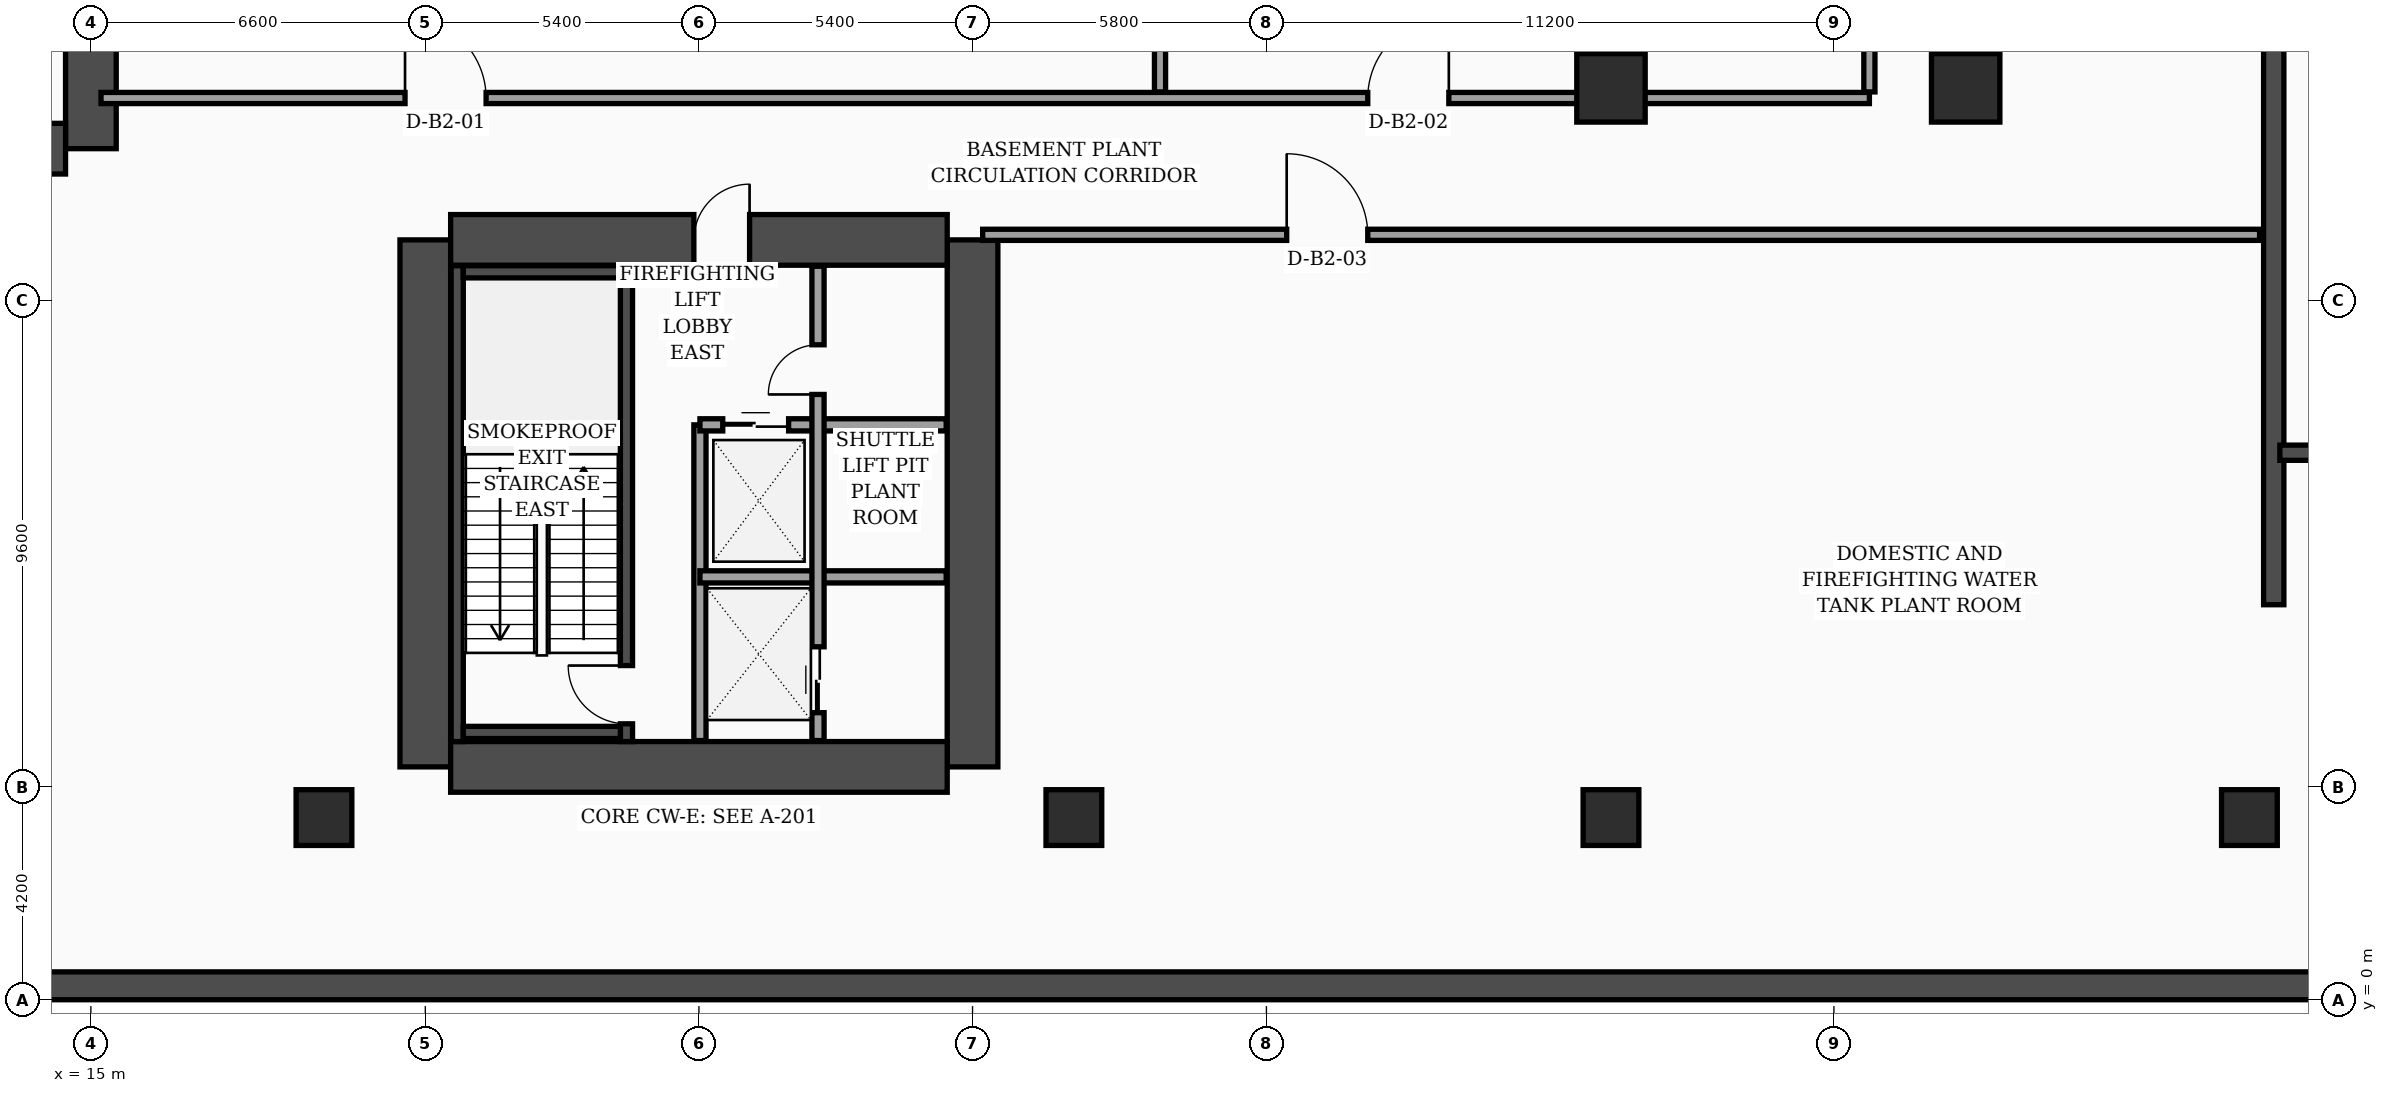
"""IFC4 building model, lengths in metres.
Left out: names, types, materials, properties, quantities, classifications, styles, units other than length and angle.
Written with IfcOpenShell. Run it as: python <this file> out.ifc"""

import sys

from ifc_helpers import new_model, si_unit, direction, frame, frame_2d, origin, origin_2d, place, context, subcontext, project, spatial, rectangle, hollow_rectangle, extrude, element, fill, save


model = new_model("IFC4")
c1 = context("Model", 3, precision=1e-05, world=origin(), true_north=direction((0.0, 1.0)))
c2 = subcontext(c1, "Body", "Model", "MODEL_VIEW")
j1 = project(units=[si_unit("LENGTHUNIT", "METRE"), si_unit("PLANEANGLEUNIT", "RADIAN")], contexts=[c1])
p1 = place(None, origin())
s1 = spatial("IfcSite", under=j1, at=p1, CompositionType="ELEMENT")
p2 = place(p1, origin())
s2 = spatial("IfcBuilding", under=s1, at=p2, CompositionType="ELEMENT")
p3 = place(p2, frame((0.0, 0.0, -10.4)))
s3 = spatial("IfcBuildingStorey", under=s2, at=p3, CompositionType="ELEMENT", Elevation=-10.4)
p4 = place(p3, frame((0.28, 0.28, 0.0), z_axis=(0.0, 0.0, 1.0), x_axis=(1.0, 0.0, 0.0)))
e1 = element("IfcWall", 1, at=p4, inside=s3, PredefinedType="USERDEFINED", context=c2, shape_type="SweptSolid", body=[
    extrude(rectangle(XDim=83.44, YDim=0.55, at=frame_2d((41.72, 0.0))), origin(), (0.0, 0.0, 1.0), 4.88),
])
p5 = place(p3, frame((15.0, 16.8, 0.0), z_axis=(0.0, 0.0, 1.0), x_axis=(0.0, 1.0, 0.0)))
e2 = element("IfcWall", 2, at=p5, inside=s3, PredefinedType="SHEAR", context=c2, shape_type="SweptSolid", body=[
    extrude(rectangle(XDim=21.6, YDim=1.0, at=frame_2d((10.8, 0.0))), origin(), (0.0, 0.0, 1.0), 4.88),
])
p6 = place(p5, frame((8.65, 0.0, 0.0)))
e3 = element("IfcOpeningElement", 3, at=p6, cuts=e2, PredefinedType="OPENING", context=c2, shape_type="SweptSolid", body=[
    extrude(rectangle(XDim=1.1, YDim=2.2, at=frame_2d((0.55, 1.1))), frame((0.0, 0.51, 0.0), z_axis=(0.0, -1.0, 0.0), x_axis=(1.0, 0.0, 0.0)), (0.0, 0.0, 1.0), 1.02),
])
p7 = place(p3, frame((4.7, 16.8, 0.0), z_axis=(0.0, 0.0, 1.0), x_axis=(1.0, 0.0, 0.0)))
e4 = element("IfcWall", 4, at=p7, inside=s3, PredefinedType="SHEAR", context=c2, shape_type="SweptSolid", body=[
    extrude(rectangle(XDim=9.8, YDim=1.0, at=frame_2d((4.9, 0.0))), origin(), (0.0, 0.0, 1.0), 4.88),
])
for number, where, z_axis, x_axis in (
    (5, (21.6, 4.6, 0.0), (0.0, 0.0, 1.0), (0.0, 1.0, 0.0)),
    (6, (32.4, 4.6, 0.0), (0.0, 0.0, 1.0), (0.0, 1.0, 0.0)),
):
    element("IfcWall", number, at=place(p3, frame(where, z_axis=z_axis, x_axis=x_axis)), inside=s3, PredefinedType="SHEAR", context=c2, shape_type="SweptSolid", body=[
        extrude(rectangle(XDim=10.4, YDim=1.0, at=frame_2d((5.2, 0.0))), origin(), (0.0, 0.0, 1.0), 4.88),
    ])
p8 = place(p3, frame((22.1, 15.0, 0.0), z_axis=(0.0, 0.0, 1.0), x_axis=(1.0, 0.0, 0.0)))
e7 = element("IfcWall", 7, at=p8, inside=s3, PredefinedType="SHEAR", context=c2, shape_type="SweptSolid", body=[
    extrude(rectangle(XDim=9.8, YDim=1.0, at=frame_2d((4.9, 0.0))), origin(), (0.0, 0.0, 1.0), 4.88),
])
p9 = place(p8, frame((4.8, 0.0, 0.0)))
e8 = element("IfcOpeningElement", 8, at=p9, cuts=e7, PredefinedType="OPENING", context=c2, shape_type="SweptSolid", body=[
    extrude(rectangle(XDim=1.1, YDim=2.2, at=frame_2d((0.55, 1.1))), frame((0.0, 0.51, 0.0), z_axis=(0.0, -1.0, 0.0), x_axis=(1.0, 0.0, 0.0)), (0.0, 0.0, 1.0), 1.02),
])
p10 = place(p3, frame((22.1, 4.6, 0.0), z_axis=(0.0, 0.0, 1.0), x_axis=(1.0, 0.0, 0.0)))
e9 = element("IfcWall", 9, at=p10, inside=s3, PredefinedType="SHEAR", context=c2, shape_type="SweptSolid", body=[
    extrude(rectangle(XDim=9.8, YDim=1.0, at=frame_2d((4.9, 0.0))), origin(), (0.0, 0.0, 1.0), 4.88),
])
p11 = place(p3, frame((22.23, 5.1, 0.0), z_axis=(0.0, 0.0, 1.0), x_axis=(0.0, 1.0, 0.0)))
e10 = element("IfcWall", 10, at=p11, inside=s3, PredefinedType="SOLIDWALL", context=c2, shape_type="SweptSolid", body=[
    extrude(rectangle(XDim=9.39, YDim=0.24, at=frame_2d((4.695, 0.0))), origin(), (0.0, 0.0, 1.0), 4.88),
])
p12 = place(p3, frame((25.57, 5.1, 0.0), z_axis=(0.0, 0.0, 1.0), x_axis=(0.0, 1.0, 0.0)))
e11 = element("IfcWall", 11, at=p12, inside=s3, PredefinedType="SOLIDWALL", context=c2, shape_type="SweptSolid", body=[
    extrude(rectangle(XDim=9.39, YDim=0.24, at=frame_2d((4.695, 0.0))), origin(), (0.0, 0.0, 1.0), 4.88),
])
p13 = place(p12, frame((0.35, 0.0, 0.0)))
e12 = element("IfcOpeningElement", 12, at=p13, cuts=e11, PredefinedType="OPENING", context=c2, shape_type="SweptSolid", body=[
    extrude(rectangle(XDim=1.15, YDim=2.2, at=frame_2d((0.575, 1.1))), frame((0.0, 0.13, 0.0), z_axis=(0.0, -1.0, 0.0), x_axis=(1.0, 0.0, 0.0)), (0.0, 0.0, 1.0), 0.26),
])
for number, where, z_axis, x_axis in (
    (13, (22.35, 5.28, 0.0), (0.0, 0.0, 1.0), (1.0, 0.0, 0.0)),
    (14, (22.35, 14.37, 0.0), (0.0, 0.0, 1.0), (1.0, 0.0, 0.0)),
):
    element("IfcWall", number, at=place(p3, frame(where, z_axis=z_axis, x_axis=x_axis)), inside=s3, PredefinedType="SOLIDWALL", context=c2, shape_type="SweptSolid", body=[
        extrude(rectangle(XDim=3.1, YDim=0.24, at=frame_2d((1.55, 0.0))), origin(), (0.0, 0.0, 1.0), 4.88),
    ])
for number, where, z_axis, x_axis in (
    (15, (19.6, 3.6, 0.0), (0.0, 0.0, 1.0), (1.0, 0.0, 0.0)),
    (16, (34.4, 3.6, 0.0), (0.0, 0.0, 1.0), (1.0, 0.0, 0.0)),
    (17, (45.0, 3.6, 0.0), (0.0, 0.0, 1.0), (1.0, 0.0, 0.0)),
    (18, (57.6, 3.6, 0.0), (0.0, 0.0, 1.0), (1.0, 0.0, 0.0)),
):
    element("IfcColumn", number, at=place(p3, frame(where, z_axis=z_axis, x_axis=x_axis)), inside=s3, PredefinedType="COLUMN", context=c2, shape_type="SweptSolid", body=[
        extrude(hollow_rectangle(XDim=1.1, YDim=1.1, WallThickness=0.045, at=origin_2d()), origin(), (0.0, 0.0, 1.0), 4.88),
    ])
for number, where, z_axis, x_axis in (
    (19, (45.0, 18.0, 0.0), (0.0, 0.0, 1.0), (1.0, 0.0, 0.0)),
    (20, (52.0, 18.0, 0.0), (0.0, 0.0, 1.0), (1.0, 0.0, 0.0)),
):
    element("IfcColumn", number, at=place(p3, frame(where, z_axis=z_axis, x_axis=x_axis)), inside=s3, PredefinedType="COLUMN", context=c2, shape_type="SweptSolid", body=[
        extrude(rectangle(XDim=1.35, YDim=1.35, at=origin_2d()), origin(), (0.0, 0.0, 1.0), 4.88),
    ])
p14 = place(p3, frame((58.08, 7.8, 0.0), z_axis=(0.0, 0.0, 1.0), x_axis=(0.0, 1.0, 0.0)))
e21 = element("IfcWall", 21, at=p14, inside=s3, PredefinedType="USERDEFINED", context=c2, shape_type="SweptSolid", body=[
    extrude(rectangle(XDim=35.3, YDim=0.4, at=frame_2d((17.65, 0.0))), origin(), (0.0, 0.0, 1.0), 4.88),
])
p15 = place(p3, frame((58.2, 10.8, 0.0), z_axis=(0.0, 0.0, 1.0), x_axis=(1.0, 0.0, 0.0)))
e22 = element("IfcWall", 22, at=p15, inside=s3, PredefinedType="SOLIDWALL", context=c2, shape_type="SweptSolid", body=[
    extrude(rectangle(XDim=6.6, YDim=0.3, at=frame_2d((3.3, 0.0))), origin(), (0.0, 0.0, 1.0), 4.88),
])
p16 = place(p3, frame((27.02, 5.12, 0.0), z_axis=(0.0, 0.0, 1.0), x_axis=(0.0, 1.0, 0.0)))
e23 = element("IfcWall", 23, at=p16, inside=s3, PredefinedType="SOLIDWALL", context=c2, shape_type="SweptSolid", body=[
    extrude(rectangle(XDim=6.23, YDim=0.24, at=frame_2d((3.115, 0.0))), origin(), (0.0, 0.0, 1.0), 4.88),
])
p17 = place(p3, frame((27.02, 11.35, 0.0), z_axis=(0.0, 0.0, 1.0), x_axis=(1.0, 0.0, 0.0)))
e24 = element("IfcWall", 24, at=p17, inside=s3, PredefinedType="SOLIDWALL", context=c2, shape_type="SweptSolid", body=[
    extrude(rectangle(XDim=4.86, YDim=0.24, at=frame_2d((2.43, 0.0))), origin(), (0.0, 0.0, 1.0), 4.88),
])
p18 = place(p17, frame((0.45, 0.0, 0.0)))
e25 = element("IfcOpeningElement", 25, at=p18, cuts=e24, PredefinedType="OPENING", context=c2, shape_type="SweptSolid", body=[
    extrude(rectangle(XDim=1.3, YDim=2.35, at=frame_2d((0.65, 1.175))), frame((0.0, 0.13, 0.0), z_axis=(0.0, -1.0, 0.0), x_axis=(1.0, 0.0, 0.0)), (0.0, 0.0, 1.0), 0.26),
])
p19 = place(p3, frame((27.02, 8.35, 0.0), z_axis=(0.0, 0.0, 1.0), x_axis=(1.0, 0.0, 0.0)))
e26 = element("IfcWall", 26, at=p19, inside=s3, PredefinedType="SOLIDWALL", context=c2, shape_type="SweptSolid", body=[
    extrude(rectangle(XDim=4.86, YDim=0.24, at=frame_2d((2.43, 0.0))), origin(), (0.0, 0.0, 1.0), 4.88),
])
p20 = place(p3, frame((29.35, 5.12, 0.0), z_axis=(0.0, 0.0, 1.0), x_axis=(0.0, 1.0, 0.0)))
e27 = element("IfcWall", 27, at=p20, inside=s3, PredefinedType="SOLIDWALL", context=c2, shape_type="SweptSolid", body=[
    extrude(rectangle(XDim=9.36, YDim=0.24, at=frame_2d((4.68, 0.0))), origin(), (0.0, 0.0, 1.0), 4.88),
])
p21 = place(p20, frame((0.55, 0.0, 0.0)))
e28 = element("IfcOpeningElement", 28, at=p21, cuts=e27, PredefinedType="OPENING", context=c2, shape_type="SweptSolid", body=[
    extrude(rectangle(XDim=1.3, YDim=2.35, at=frame_2d((0.65, 1.175))), frame((0.0, 0.13, 0.0), z_axis=(0.0, -1.0, 0.0), x_axis=(1.0, 0.0, 0.0)), (0.0, 0.0, 1.0), 0.26),
])
p22 = place(p20, frame((6.83, 0.0, 0.0)))
e29 = element("IfcOpeningElement", 29, at=p22, cuts=e27, PredefinedType="OPENING", context=c2, shape_type="SweptSolid", body=[
    extrude(rectangle(XDim=0.98, YDim=2.15, at=frame_2d((0.49, 1.075))), frame((0.0, 0.13, 0.0), z_axis=(0.0, -1.0, 0.0), x_axis=(1.0, 0.0, 0.0)), (0.0, 0.0, 1.0), 0.26),
])
p23 = place(p3, frame((15.2, 17.8, 0.0), z_axis=(0.0, 0.0, 1.0), x_axis=(1.0, 0.0, 0.0)))
e30 = element("IfcWall", 30, at=p23, inside=s3, PredefinedType="SOLIDWALL", context=c2, shape_type="SweptSolid", body=[
    extrude(rectangle(XDim=34.9, YDim=0.22, at=frame_2d((17.45, 0.0))), origin(), (0.0, 0.0, 1.0), 3.28),
])
p24 = place(p23, frame((6.0, 0.0, 0.0)))
e31 = element("IfcOpeningElement", 31, at=p24, cuts=e30, PredefinedType="OPENING", context=c2, shape_type="SweptSolid", body=[
    extrude(rectangle(XDim=1.6, YDim=2.35, at=frame_2d((0.8, 1.175))), frame((0.0, 0.12, 0.0), z_axis=(0.0, -1.0, 0.0), x_axis=(1.0, 0.0, 0.0)), (0.0, 0.0, 1.0), 0.24),
])
p25 = place(p23, frame((25.0, 0.0, 0.0)))
e32 = element("IfcOpeningElement", 32, at=p25, cuts=e30, PredefinedType="OPENING", context=c2, shape_type="SweptSolid", body=[
    extrude(rectangle(XDim=1.6, YDim=2.35, at=frame_2d((0.8, 1.175))), frame((0.0, 0.12, 0.0), z_axis=(0.0, -1.0, 0.0), x_axis=(1.0, 0.0, 0.0)), (0.0, 0.0, 1.0), 0.24),
])
p26 = place(p3, frame((32.6, 15.1, 0.0), z_axis=(0.0, 0.0, 1.0), x_axis=(1.0, 0.0, 0.0)))
e33 = element("IfcWall", 33, at=p26, inside=s3, PredefinedType="SOLIDWALL", context=c2, shape_type="SweptSolid", body=[
    extrude(rectangle(XDim=25.2, YDim=0.22, at=frame_2d((12.6, 0.0))), origin(), (0.0, 0.0, 1.0), 3.28),
])
p27 = place(p26, frame((6.0, 0.0, 0.0)))
e34 = element("IfcOpeningElement", 34, at=p27, cuts=e33, PredefinedType="OPENING", context=c2, shape_type="SweptSolid", body=[
    extrude(rectangle(XDim=1.6, YDim=2.35, at=frame_2d((0.8, 1.175))), frame((0.0, 0.12, 0.0), z_axis=(0.0, -1.0, 0.0), x_axis=(1.0, 0.0, 0.0)), (0.0, 0.0, 1.0), 0.24),
])
p28 = place(p3, frame((50.1, 17.92, 0.0), z_axis=(0.0, 0.0, 1.0), x_axis=(0.0, 1.0, 0.0)))
e35 = element("IfcWall", 35, at=p28, inside=s3, PredefinedType="SOLIDWALL", context=c2, shape_type="SweptSolid", body=[
    extrude(rectangle(XDim=39.66, YDim=0.22, at=frame_2d((19.83, 0.0))), origin(), (0.0, 0.0, 1.0), 4.08),
])
p29 = place(p28, frame((22.5, 0.0, 0.0)))
e36 = element("IfcOpeningElement", 36, at=p29, cuts=e35, PredefinedType="OPENING", context=c2, shape_type="SweptSolid", body=[
    extrude(rectangle(XDim=1.6, YDim=2.35, at=frame_2d((0.8, 1.175))), frame((0.0, 0.12, 0.0), z_axis=(0.0, -1.0, 0.0), x_axis=(1.0, 0.0, 0.0)), (0.0, 0.0, 1.0), 0.24),
])
p30 = place(p3, frame((36.1, 17.92, 0.0), z_axis=(0.0, 0.0, 1.0), x_axis=(0.0, 1.0, 0.0)))
e37 = element("IfcWall", 37, at=p30, inside=s3, PredefinedType="SOLIDWALL", context=c2, shape_type="SweptSolid", body=[
    extrude(rectangle(XDim=39.66, YDim=0.22, at=frame_2d((19.83, 0.0))), origin(), (0.0, 0.0, 1.0), 4.08),
])
p31 = place(p18, origin())
e38 = element("IfcDoor", 38, at=p31, inside=s3, OperationType="DOUBLE_DOOR_SLIDING", PredefinedType="DOOR", context=c2, shape_type="SweptSolid", body=[
    extrude(rectangle(XDim=1.3, YDim=2.35, at=frame_2d((0.65, 1.175))), frame((0.0, 0.025, 0.0), z_axis=(0.0, -1.0, 0.0), x_axis=(1.0, 0.0, 0.0)), (0.0, 0.0, 1.0), 0.05),
])
fill(e25, e38)
p32 = place(p21, origin())
e39 = element("IfcDoor", 39, at=p32, inside=s3, OperationType="DOUBLE_DOOR_SLIDING", PredefinedType="DOOR", context=c2, shape_type="SweptSolid", body=[
    extrude(rectangle(XDim=1.3, YDim=2.35, at=frame_2d((0.65, 1.175))), frame((0.0, 0.025, 0.0), z_axis=(0.0, -1.0, 0.0), x_axis=(1.0, 0.0, 0.0)), (0.0, 0.0, 1.0), 0.05),
])
fill(e28, e39)
p33 = place(p22, origin())
e40 = element("IfcDoor", 40, at=p33, inside=s3, OperationType="SINGLE_SWING_LEFT", PredefinedType="DOOR", context=c2, shape_type="SweptSolid", body=[
    extrude(rectangle(XDim=0.98, YDim=2.15, at=frame_2d((0.49, 1.075))), frame((0.0, 0.025, 0.0), z_axis=(0.0, -1.0, 0.0), x_axis=(1.0, 0.0, 0.0)), (0.0, 0.0, 1.0), 0.05),
])
fill(e29, e40)
p34 = place(p24, origin())
e41 = element("IfcDoor", 41, at=p34, inside=s3, OperationType="SINGLE_SWING_LEFT", PredefinedType="DOOR", context=c2, shape_type="SweptSolid", body=[
    extrude(rectangle(XDim=1.6, YDim=2.35, at=frame_2d((0.8, 1.175))), frame((0.0, 0.025, 0.0), z_axis=(0.0, -1.0, 0.0), x_axis=(1.0, 0.0, 0.0)), (0.0, 0.0, 1.0), 0.05),
])
fill(e31, e41)
p35 = place(p25, origin())
e42 = element("IfcDoor", 42, at=p35, inside=s3, OperationType="SINGLE_SWING_RIGHT", PredefinedType="DOOR", context=c2, shape_type="SweptSolid", body=[
    extrude(rectangle(XDim=1.6, YDim=2.35, at=frame_2d((0.8, 1.175))), frame((0.0, 0.025, 0.0), z_axis=(0.0, -1.0, 0.0), x_axis=(1.0, 0.0, 0.0)), (0.0, 0.0, 1.0), 0.05),
])
fill(e32, e42)
p36 = place(p27, origin())
e43 = element("IfcDoor", 43, at=p36, inside=s3, OperationType="SINGLE_SWING_LEFT", PredefinedType="DOOR", context=c2, shape_type="SweptSolid", body=[
    extrude(rectangle(XDim=1.6, YDim=2.35, at=frame_2d((0.8, 1.175))), frame((0.0, 0.025, 0.0), z_axis=(0.0, -1.0, 0.0), x_axis=(1.0, 0.0, 0.0)), (0.0, 0.0, 1.0), 0.05),
])
fill(e34, e43)
p37 = place(p13, origin())
e44 = element("IfcDoor", 44, at=p37, inside=s3, OperationType="SINGLE_SWING_RIGHT", PredefinedType="DOOR", context=c2, shape_type="SweptSolid", body=[
    extrude(rectangle(XDim=1.15, YDim=2.2, at=frame_2d((0.575, 1.1))), frame((0.0, 0.025, 0.0), z_axis=(0.0, -1.0, 0.0), x_axis=(1.0, 0.0, 0.0)), (0.0, 0.0, 1.0), 0.05),
])
fill(e12, e44)
p38 = place(p9, origin())
e45 = element("IfcDoor", 45, at=p38, inside=s3, OperationType="SINGLE_SWING_RIGHT", PredefinedType="DOOR", context=c2, shape_type="SweptSolid", body=[
    extrude(rectangle(XDim=1.1, YDim=2.2, at=frame_2d((0.55, 1.1))), frame((0.0, 0.025, 0.0), z_axis=(0.0, -1.0, 0.0), x_axis=(1.0, 0.0, 0.0)), (0.0, 0.0, 1.0), 0.05),
])
fill(e8, e45)
save(model, sys.argv[1])
